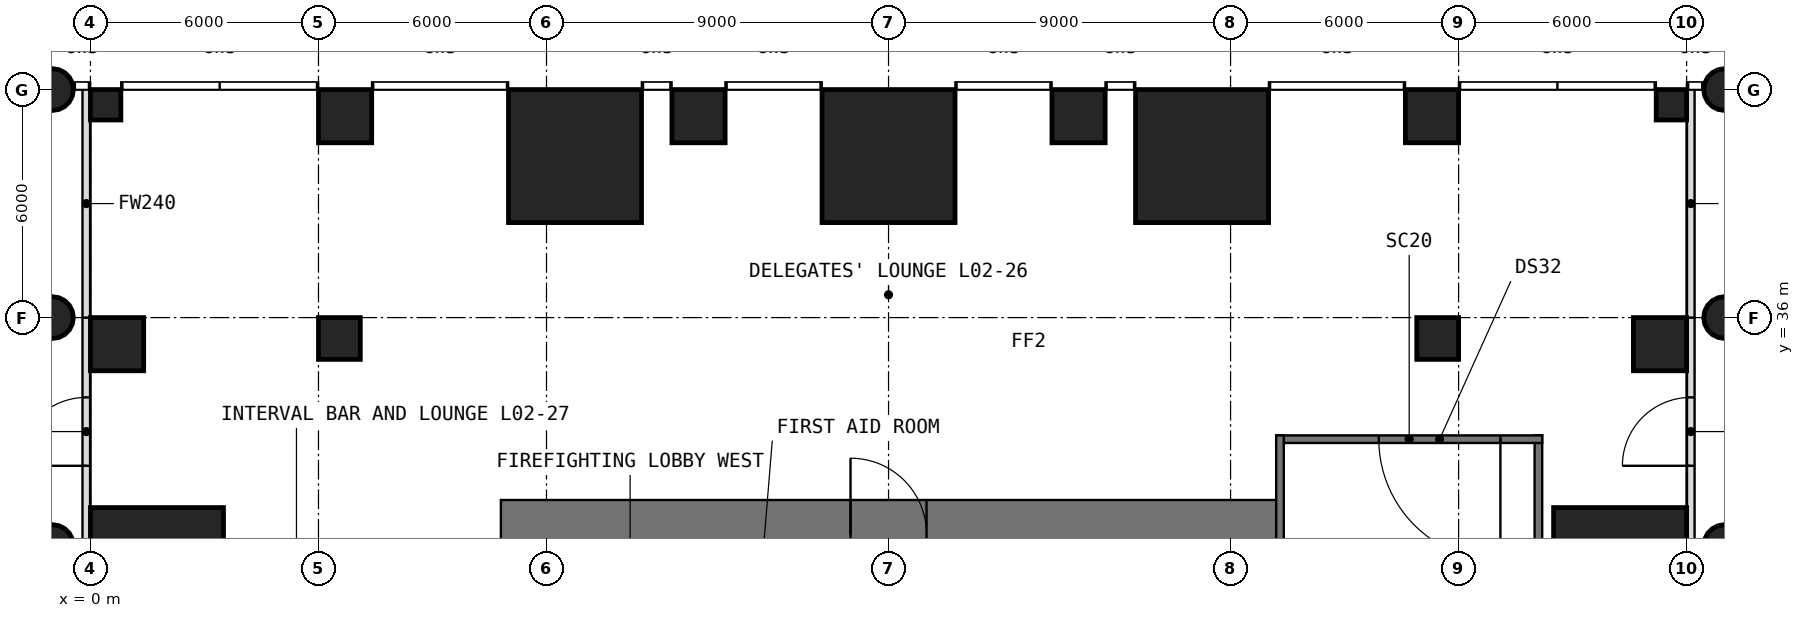
"""IFC4 building model, lengths in metres.
Left out: names, types, materials, properties, quantities, classifications, styles, units other than length and angle.
Written with IfcOpenShell. Run it as: python <this file> out.ifc"""

import sys

from ifc_helpers import new_model, si_unit, direction, frame, frame_2d, origin, origin_2d, place, context, subcontext, project, spatial, rectangle, circle, extrude, element, fill, save


model = new_model("IFC4")
c1 = context("Model", 3, precision=1e-05, world=origin(), true_north=direction((0.0, 1.0)))
c2 = subcontext(c1, "Body", "Model", "MODEL_VIEW")
j1 = project(units=[si_unit("LENGTHUNIT", "METRE"), si_unit("PLANEANGLEUNIT", "RADIAN")], contexts=[c1])
p1 = place(None, origin())
s1 = spatial("IfcSite", under=j1, at=p1, CompositionType="ELEMENT")
p2 = place(p1, origin())
s2 = spatial("IfcBuilding", under=s1, at=p2, CompositionType="ELEMENT")
p3 = place(p2, frame((0.0, 0.0, 11.0)))
s3 = spatial("IfcBuildingStorey", under=s2, at=p3, CompositionType="ELEMENT", Elevation=11.0)
p4 = place(p3, frame((-1.0, 30.0, 0.0), z_axis=(0.0, 0.0, 1.0), x_axis=(1.0, 0.0, 0.0)))
e1 = element("IfcColumn", 1, at=p4, inside=s3, PredefinedType="COLUMN", context=c2, shape_type="SweptSolid", body=[
    extrude(circle(Radius=0.55, at=origin_2d()), origin(), (0.0, 0.0, 1.0), 7.0),
])
p5 = place(p3, frame((-1.41, 30.0, 3.556), z_axis=(0.0, 0.0, 1.0), x_axis=(1.0, 0.0, 0.0)))
e2 = element("IfcOpeningElement", 2, at=p5, cuts=e1, PredefinedType="RECESS", context=c2, shape_type="SweptSolid", body=[
    extrude(rectangle(XDim=0.32, YDim=0.474, at=origin_2d()), origin(), (0.0, 0.0, 1.0), 0.719),
])
p6 = place(p3, frame((43.0, 30.0, 0.0), z_axis=(0.0, 0.0, 1.0), x_axis=(1.0, 0.0, 0.0)))
e3 = element("IfcColumn", 3, at=p6, inside=s3, PredefinedType="COLUMN", context=c2, shape_type="SweptSolid", body=[
    extrude(circle(Radius=0.55, at=origin_2d()), origin(), (0.0, 0.0, 1.0), 7.0),
])
for number, where, z_axis, x_axis in (
    (4, (1.75, 29.25, 0.0), (0.0, 0.0, 1.0), (1.0, 0.0, 0.0)),
    (5, (40.25, 29.25, 0.0), (0.0, 0.0, 1.0), (1.0, 0.0, 0.0)),
):
    element("IfcColumn", number, at=place(p3, frame(where, z_axis=z_axis, x_axis=x_axis)), inside=s3, PredefinedType="COLUMN", context=c2, shape_type="SweptSolid", body=[
        extrude(rectangle(XDim=3.5, YDim=3.5, at=origin_2d()), origin(), (0.0, 0.0, 1.0), 7.0),
    ])
p7 = place(p3, frame((-1.0, 36.0, 0.0), z_axis=(0.0, 0.0, 1.0), x_axis=(1.0, 0.0, 0.0)))
e6 = element("IfcColumn", 6, at=p7, inside=s3, PredefinedType="COLUMN", context=c2, shape_type="SweptSolid", body=[
    extrude(circle(Radius=0.55, at=origin_2d()), origin(), (0.0, 0.0, 1.0), 7.0),
])
p8 = place(p3, frame((-1.41, 36.0, 3.556), z_axis=(0.0, 0.0, 1.0), x_axis=(1.0, 0.0, 0.0)))
e7 = element("IfcOpeningElement", 7, at=p8, cuts=e6, PredefinedType="RECESS", context=c2, shape_type="SweptSolid", body=[
    extrude(rectangle(XDim=0.32, YDim=0.474, at=origin_2d()), origin(), (0.0, 0.0, 1.0), 0.719),
])
p9 = place(p3, frame((0.7, 35.3, 0.0), z_axis=(0.0, 0.0, 1.0), x_axis=(1.0, 0.0, 0.0)))
e8 = element("IfcColumn", 8, at=p9, inside=s3, PredefinedType="COLUMN", context=c2, shape_type="SweptSolid", body=[
    extrude(rectangle(XDim=1.4, YDim=1.4, at=origin_2d()), origin(), (0.0, 0.0, 1.0), 7.0),
])
for number, where, z_axis, x_axis in (
    (9, (6.55, 35.45, 0.0), (0.0, 0.0, 1.0), (1.0, 0.0, 0.0)),
    (10, (35.45, 35.45, 0.0), (0.0, 0.0, 1.0), (1.0, 0.0, 0.0)),
):
    element("IfcColumn", number, at=place(p3, frame(where, z_axis=z_axis, x_axis=x_axis)), inside=s3, PredefinedType="COLUMN", context=c2, shape_type="SweptSolid", body=[
        extrude(rectangle(XDim=1.1, YDim=1.1, at=origin_2d()), origin(), (0.0, 0.0, 1.0), 7.0),
    ])
p10 = place(p3, frame((41.3, 35.3, 0.0), z_axis=(0.0, 0.0, 1.0), x_axis=(1.0, 0.0, 0.0)))
e11 = element("IfcColumn", 11, at=p10, inside=s3, PredefinedType="COLUMN", context=c2, shape_type="SweptSolid", body=[
    extrude(rectangle(XDim=1.4, YDim=1.4, at=origin_2d()), origin(), (0.0, 0.0, 1.0), 7.0),
])
for number, where, z_axis, x_axis in (
    (12, (43.0, 36.0, 0.0), (0.0, 0.0, 1.0), (1.0, 0.0, 0.0)),
    (13, (-1.0, 42.0, 0.0), (0.0, 0.0, 1.0), (1.0, 0.0, 0.0)),
):
    element("IfcColumn", number, at=place(p3, frame(where, z_axis=z_axis, x_axis=x_axis)), inside=s3, PredefinedType="COLUMN", context=c2, shape_type="SweptSolid", body=[
        extrude(circle(Radius=0.55, at=origin_2d()), origin(), (0.0, 0.0, 1.0), 7.0),
    ])
p11 = place(p3, frame((0.4, 41.6, 0.0), z_axis=(0.0, 0.0, 1.0), x_axis=(1.0, 0.0, 0.0)))
e14 = element("IfcColumn", 14, at=p11, inside=s3, PredefinedType="COLUMN", context=c2, shape_type="SweptSolid", body=[
    extrude(rectangle(XDim=0.8, YDim=0.8, at=origin_2d()), origin(), (0.0, 0.0, 1.0), 7.0),
])
p12 = place(p3, frame((6.7, 41.3, 0.0), z_axis=(0.0, 0.0, 1.0), x_axis=(1.0, 0.0, 0.0)))
e15 = element("IfcColumn", 15, at=p12, inside=s3, PredefinedType="COLUMN", context=c2, shape_type="SweptSolid", body=[
    extrude(rectangle(XDim=1.4, YDim=1.4, at=origin_2d()), origin(), (0.0, 0.0, 1.0), 7.0),
])
p13 = place(p3, frame((12.75, 40.25, 0.0), z_axis=(0.0, 0.0, 1.0), x_axis=(1.0, 0.0, 0.0)))
e16 = element("IfcColumn", 16, at=p13, inside=s3, PredefinedType="COLUMN", context=c2, shape_type="SweptSolid", body=[
    extrude(rectangle(XDim=3.5, YDim=3.5, at=origin_2d()), origin(), (0.0, 0.0, 1.0), 7.0),
])
p14 = place(p3, frame((16.0, 41.3, 0.0), z_axis=(0.0, 0.0, 1.0), x_axis=(1.0, 0.0, 0.0)))
e17 = element("IfcColumn", 17, at=p14, inside=s3, PredefinedType="COLUMN", context=c2, shape_type="SweptSolid", body=[
    extrude(rectangle(XDim=1.4, YDim=1.4, at=origin_2d()), origin(), (0.0, 0.0, 1.0), 7.0),
])
p15 = place(p3, frame((21.0, 40.25, 0.0), z_axis=(0.0, 0.0, 1.0), x_axis=(1.0, 0.0, 0.0)))
e18 = element("IfcColumn", 18, at=p15, inside=s3, PredefinedType="COLUMN", context=c2, shape_type="SweptSolid", body=[
    extrude(rectangle(XDim=3.5, YDim=3.5, at=origin_2d()), origin(), (0.0, 0.0, 1.0), 7.0),
])
p16 = place(p3, frame((26.0, 41.3, 0.0), z_axis=(0.0, 0.0, 1.0), x_axis=(1.0, 0.0, 0.0)))
e19 = element("IfcColumn", 19, at=p16, inside=s3, PredefinedType="COLUMN", context=c2, shape_type="SweptSolid", body=[
    extrude(rectangle(XDim=1.4, YDim=1.4, at=origin_2d()), origin(), (0.0, 0.0, 1.0), 7.0),
])
p17 = place(p3, frame((29.25, 40.25, 0.0), z_axis=(0.0, 0.0, 1.0), x_axis=(1.0, 0.0, 0.0)))
e20 = element("IfcColumn", 20, at=p17, inside=s3, PredefinedType="COLUMN", context=c2, shape_type="SweptSolid", body=[
    extrude(rectangle(XDim=3.5, YDim=3.5, at=origin_2d()), origin(), (0.0, 0.0, 1.0), 7.0),
])
p18 = place(p3, frame((35.3, 41.3, 0.0), z_axis=(0.0, 0.0, 1.0), x_axis=(1.0, 0.0, 0.0)))
e21 = element("IfcColumn", 21, at=p18, inside=s3, PredefinedType="COLUMN", context=c2, shape_type="SweptSolid", body=[
    extrude(rectangle(XDim=1.4, YDim=1.4, at=origin_2d()), origin(), (0.0, 0.0, 1.0), 7.0),
])
p19 = place(p3, frame((41.6, 41.6, 0.0), z_axis=(0.0, 0.0, 1.0), x_axis=(1.0, 0.0, 0.0)))
e22 = element("IfcColumn", 22, at=p19, inside=s3, PredefinedType="COLUMN", context=c2, shape_type="SweptSolid", body=[
    extrude(rectangle(XDim=0.8, YDim=0.8, at=origin_2d()), origin(), (0.0, 0.0, 1.0), 7.0),
])
p20 = place(p3, frame((43.0, 42.0, 0.0), z_axis=(0.0, 0.0, 1.0), x_axis=(1.0, 0.0, 0.0)))
e23 = element("IfcColumn", 23, at=p20, inside=s3, PredefinedType="COLUMN", context=c2, shape_type="SweptSolid", body=[
    extrude(circle(Radius=0.55, at=origin_2d()), origin(), (0.0, 0.0, 1.0), 7.0),
])
p21 = place(p3, frame((10.8, 30.3, -0.3), z_axis=(0.0, 0.0, 1.0), x_axis=(1.0, 0.0, 0.0)))
e24 = element("IfcWall", 24, at=p21, inside=s3, PredefinedType="SHEAR", context=c2, shape_type="SweptSolid", body=[
    extrude(rectangle(XDim=20.4, YDim=1.8, at=frame_2d((10.2, 0.0))), origin(), (0.0, 0.0, 1.0), 7.1),
])
p22 = place(p21, frame((9.2, 0.0, 0.3)))
e25 = element("IfcOpeningElement", 25, at=p22, cuts=e24, PredefinedType="OPENING", context=c2, shape_type="SweptSolid", body=[
    extrude(rectangle(XDim=2.0, YDim=2.2, at=frame_2d((1.0, 1.1))), frame((0.0, 0.91, 0.0), z_axis=(0.0, -1.0, 0.0), x_axis=(1.0, 0.0, 0.0)), (0.0, 0.0, 1.0), 1.82),
])
p23 = place(p3, frame((38.1, 19.8, -0.3), z_axis=(0.0, 0.0, 1.0), x_axis=(0.0, 1.0, 0.0)))
e26 = element("IfcWall", 26, at=p23, inside=s3, PredefinedType="SOLIDWALL", context=c2, shape_type="SweptSolid", body=[
    extrude(rectangle(XDim=13.1, YDim=0.2, at=frame_2d((6.55, 0.0))), origin(), (0.0, 0.0, 1.0), 7.1),
])
p24 = place(p3, frame((38.2, 32.8, -0.3), z_axis=(0.0, 0.0, 1.0), x_axis=(-1.0, 0.0, 0.0)))
e27 = element("IfcWall", 27, at=p24, inside=s3, PredefinedType="SOLIDWALL", context=c2, shape_type="SweptSolid", body=[
    extrude(rectangle(XDim=7.0, YDim=0.2, at=frame_2d((3.5, 0.0))), origin(), (0.0, 0.0, 1.0), 7.1),
])
p25 = place(p24, frame((1.1, 0.0, 0.3)))
e28 = element("IfcOpeningElement", 28, at=p25, cuts=e27, PredefinedType="OPENING", context=c2, shape_type="SweptSolid", body=[
    extrude(rectangle(XDim=3.2, YDim=2.4, at=frame_2d((1.6, 1.2))), frame((0.0, 0.11, 0.0), z_axis=(0.0, -1.0, 0.0), x_axis=(1.0, 0.0, 0.0)), (0.0, 0.0, 1.0), 0.22),
])
p26 = place(p3, frame((31.3, 32.9, -0.3), z_axis=(0.0, 0.0, 1.0), x_axis=(0.0, -1.0, 0.0)))
e29 = element("IfcWall", 29, at=p26, inside=s3, PredefinedType="SOLIDWALL", context=c2, shape_type="SweptSolid", body=[
    extrude(rectangle(XDim=13.1, YDim=0.2, at=frame_2d((6.55, 0.0))), origin(), (0.0, 0.0, 1.0), 7.1),
])
p27 = place(p3, frame((-0.11, 6.0, 0.0), z_axis=(0.0, 0.0, 1.0), x_axis=(0.0, 1.0, 0.0)))
e30 = element("IfcWall", 30, at=p27, inside=s3, PredefinedType="PARTITIONING", context=c2, shape_type="SweptSolid", body=[
    extrude(rectangle(XDim=30.0, YDim=0.2, at=frame_2d((15.0, 0.0))), origin(), (0.0, 0.0, 1.0), 6.6),
])
p28 = place(p27, frame((17.1, 0.0, 0.0)))
e31 = element("IfcOpeningElement", 31, at=p28, cuts=e30, PredefinedType="OPENING", context=c2, shape_type="SweptSolid", body=[
    extrude(rectangle(XDim=1.8, YDim=2.4, at=frame_2d((0.9, 1.2))), frame((0.0, 0.11, 0.0), z_axis=(0.0, -1.0, 0.0), x_axis=(1.0, 0.0, 0.0)), (0.0, 0.0, 1.0), 0.22),
])
p29 = place(p27, frame((26.1, 0.0, 0.0)))
e32 = element("IfcOpeningElement", 32, at=p29, cuts=e30, PredefinedType="OPENING", context=c2, shape_type="SweptSolid", body=[
    extrude(rectangle(XDim=1.8, YDim=2.4, at=frame_2d((0.9, 1.2))), frame((0.0, 0.11, 0.0), z_axis=(0.0, -1.0, 0.0), x_axis=(1.0, 0.0, 0.0)), (0.0, 0.0, 1.0), 0.22),
])
p30 = place(p3, frame((-0.11, 36.0, 0.0), z_axis=(0.0, 0.0, 1.0), x_axis=(0.0, 1.0, 0.0)))
e33 = element("IfcWall", 33, at=p30, inside=s3, PredefinedType="PARTITIONING", context=c2, shape_type="SweptSolid", body=[
    extrude(rectangle(XDim=6.0, YDim=0.2, at=frame_2d((3.0, 0.0))), origin(), (0.0, 0.0, 1.0), 5.98),
])
p31 = place(p3, frame((42.11, 6.0, 0.0), z_axis=(0.0, 0.0, 1.0), x_axis=(0.0, 1.0, 0.0)))
e34 = element("IfcWall", 34, at=p31, inside=s3, PredefinedType="PARTITIONING", context=c2, shape_type="SweptSolid", body=[
    extrude(rectangle(XDim=30.0, YDim=0.2, at=frame_2d((15.0, 0.0))), origin(), (0.0, 0.0, 1.0), 6.6),
])
p32 = place(p31, frame((1.6, 0.0, 0.0)))
e35 = element("IfcOpeningElement", 35, at=p32, cuts=e34, PredefinedType="OPENING", context=c2, shape_type="SweptSolid", body=[
    extrude(rectangle(XDim=1.8, YDim=2.4, at=frame_2d((0.9, 1.2))), frame((0.0, 0.11, 0.0), z_axis=(0.0, -1.0, 0.0), x_axis=(1.0, 0.0, 0.0)), (0.0, 0.0, 1.0), 0.22),
])
p33 = place(p31, frame((17.1, 0.0, 0.0)))
e36 = element("IfcOpeningElement", 36, at=p33, cuts=e34, PredefinedType="OPENING", context=c2, shape_type="SweptSolid", body=[
    extrude(rectangle(XDim=1.8, YDim=2.4, at=frame_2d((0.9, 1.2))), frame((0.0, 0.11, 0.0), z_axis=(0.0, -1.0, 0.0), x_axis=(1.0, 0.0, 0.0)), (0.0, 0.0, 1.0), 0.22),
])
p34 = place(p31, frame((26.1, 0.0, 0.0)))
e37 = element("IfcOpeningElement", 37, at=p34, cuts=e34, PredefinedType="OPENING", context=c2, shape_type="SweptSolid", body=[
    extrude(rectangle(XDim=1.8, YDim=2.4, at=frame_2d((0.9, 1.2))), frame((0.0, 0.11, 0.0), z_axis=(0.0, -1.0, 0.0), x_axis=(1.0, 0.0, 0.0)), (0.0, 0.0, 1.0), 0.22),
])
p35 = place(p3, frame((42.11, 36.0, 0.0), z_axis=(0.0, 0.0, 1.0), x_axis=(0.0, 1.0, 0.0)))
e38 = element("IfcWall", 38, at=p35, inside=s3, PredefinedType="PARTITIONING", context=c2, shape_type="SweptSolid", body=[
    extrude(rectangle(XDim=6.0, YDim=0.2, at=frame_2d((3.0, 0.0))), origin(), (0.0, 0.0, 1.0), 5.98),
])
p36 = place(p22, origin())
e39 = element("IfcDoor", 39, at=p36, inside=s3, OperationType="DOUBLE_DOOR_SINGLE_SWING", PredefinedType="DOOR", context=c2, shape_type="SweptSolid", body=[
    extrude(rectangle(XDim=2.0, YDim=2.2, at=frame_2d((1.0, 1.1))), frame((0.0, 0.025, 0.0), z_axis=(0.0, -1.0, 0.0), x_axis=(1.0, 0.0, 0.0)), (0.0, 0.0, 1.0), 0.05),
])
fill(e25, e39)
p37 = place(p25, origin())
e40 = element("IfcDoor", 40, at=p37, inside=s3, OperationType="DOUBLE_DOOR_SINGLE_SWING", PredefinedType="DOOR", context=c2, shape_type="SweptSolid", body=[
    extrude(rectangle(XDim=3.2, YDim=2.4, at=frame_2d((1.6, 1.2))), frame((0.0, 0.025, 0.0), z_axis=(0.0, -1.0, 0.0), x_axis=(1.0, 0.0, 0.0)), (0.0, 0.0, 1.0), 0.05),
])
fill(e28, e40)
p38 = place(p34, origin())
e41 = element("IfcDoor", 41, at=p38, inside=s3, OperationType="DOUBLE_DOOR_SINGLE_SWING", PredefinedType="DOOR", context=c2, shape_type="SweptSolid", body=[
    extrude(rectangle(XDim=1.8, YDim=2.4, at=frame_2d((0.9, 1.2))), frame((0.0, 0.025, 0.0), z_axis=(0.0, -1.0, 0.0), x_axis=(1.0, 0.0, 0.0)), (0.0, 0.0, 1.0), 0.05),
])
fill(e37, e41)
p39 = place(p29, origin())
e42 = element("IfcDoor", 42, at=p39, inside=s3, OperationType="DOUBLE_DOOR_SINGLE_SWING", PredefinedType="DOOR", context=c2, shape_type="SweptSolid", body=[
    extrude(rectangle(XDim=1.8, YDim=2.4, at=frame_2d((0.9, 1.2))), frame((0.0, 0.025, 0.0), z_axis=(0.0, -1.0, 0.0), x_axis=(1.0, 0.0, 0.0)), (0.0, 0.0, 1.0), 0.05),
])
fill(e32, e42)
save(model, sys.argv[1])
